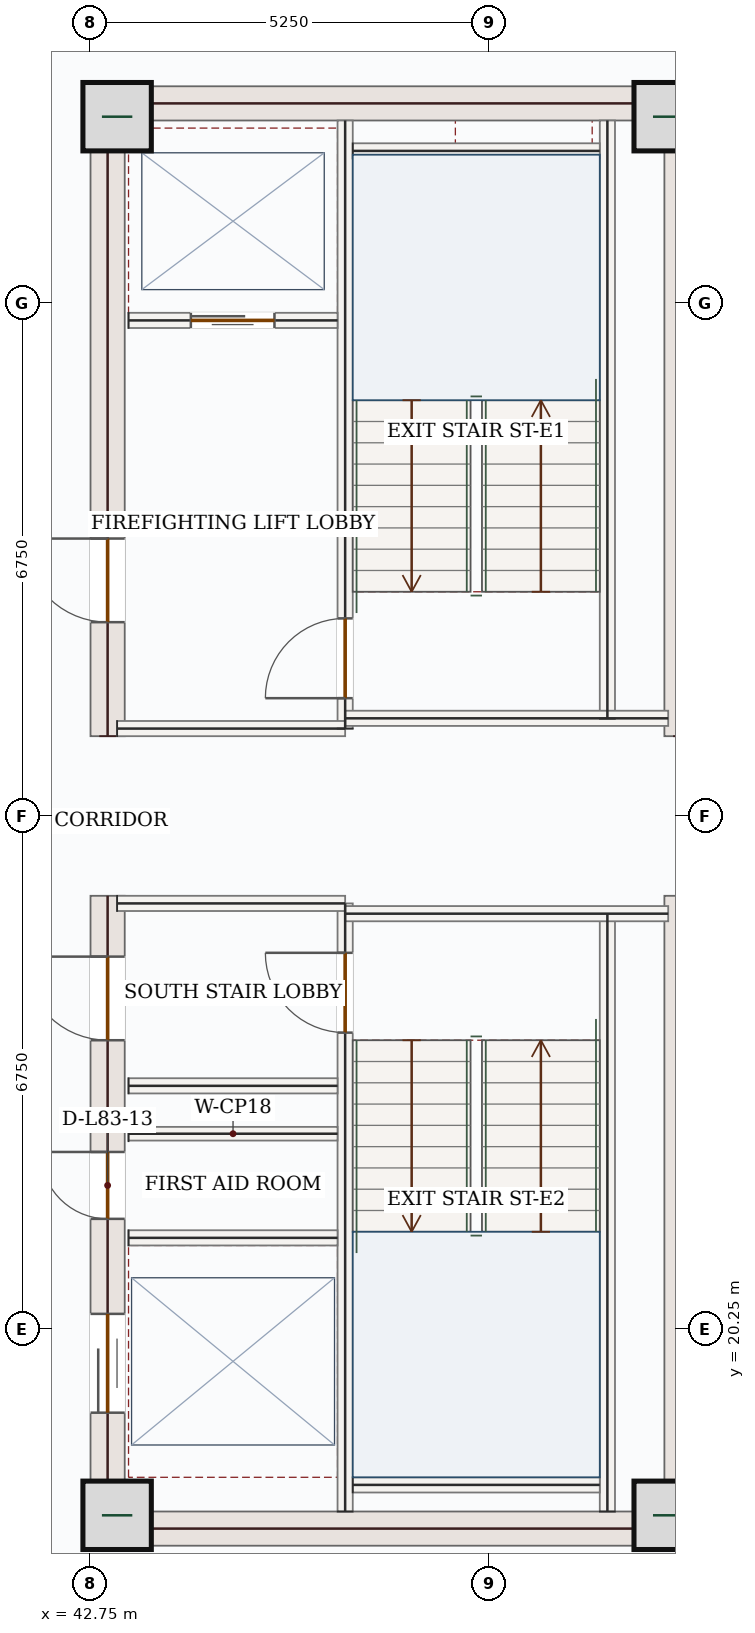
"""IFC4 building model, lengths in metres.
Left out: names, types, materials, properties, quantities, classifications, styles, units other than length and angle.
Written with IfcOpenShell. Run it as: python <this file> out.ifc"""

import sys

from ifc_helpers import new_model, si_unit, direction, frame, frame_2d, origin, origin_2d, place, context, subcontext, project, spatial, rectangle, extrude, source, transform, mapped, element, fill, save


model = new_model("IFC4")
c1 = context("Model", 3, precision=1e-05, world=origin(), true_north=direction((0.0, 1.0)))
c2 = subcontext(c1, "Body", "Model", "MODEL_VIEW")
j1 = project(units=[si_unit("LENGTHUNIT", "METRE"), si_unit("PLANEANGLEUNIT", "RADIAN")], contexts=[c1])
p1 = place(None, origin())
s1 = spatial("IfcSite", under=j1, at=p1, CompositionType="ELEMENT")
p2 = place(p1, origin())
s2 = spatial("IfcBuilding", under=s1, at=p2, CompositionType="ELEMENT")
p3 = place(p2, frame((0.0, 0.0, 342.3)))
s3 = spatial("IfcBuildingStorey", under=s2, at=p3, CompositionType="ELEMENT", Elevation=342.3)
p4 = place(p3, frame((42.975, 17.4, 0.0), z_axis=(0.0, 0.0, 1.0), x_axis=(0.0, 1.0, 0.0)))
e1 = element("IfcWall", 1, at=p4, inside=s3, PredefinedType="SHEAR", context=c2, shape_type="SweptSolid", body=[
    extrude(rectangle(XDim=8.55, YDim=0.45, at=frame_2d((4.275, 0.0))), origin(), (0.0, 0.0, 1.0), 3.5),
])
p5 = place(p4, frame((6.65, 0.0, 0.0)))
e2 = element("IfcOpeningElement", 2, at=p5, cuts=e1, PredefinedType="OPENING", context=c2, shape_type="SweptSolid", body=[
    extrude(rectangle(XDim=1.1, YDim=2.2, at=frame_2d((0.55, 1.1))), frame((0.0, 0.235, 0.0), z_axis=(0.0, -1.0, 0.0), x_axis=(1.0, 0.0, 0.0)), (0.0, 0.0, 1.0), 0.47),
])
p6 = place(p4, frame((1.75, 0.0, 0.0)))
e3 = element("IfcOpeningElement", 3, at=p6, cuts=e1, PredefinedType="OPENING", context=c2, shape_type="SweptSolid", body=[
    extrude(rectangle(XDim=1.3, YDim=2.2, at=frame_2d((0.65, 1.1))), frame((0.0, 0.235, 0.0), z_axis=(0.0, -1.0, 0.0), x_axis=(1.0, 0.0, 0.0)), (0.0, 0.0, 1.0), 0.47),
])
p7 = place(p4, frame((4.3, 0.0, 0.0)))
e4 = element("IfcOpeningElement", 4, at=p7, cuts=e1, PredefinedType="OPENING", context=c2, shape_type="SweptSolid", body=[
    extrude(rectangle(XDim=0.88, YDim=2.1, at=frame_2d((0.44, 1.05))), frame((0.0, 0.235, 0.0), z_axis=(0.0, -1.0, 0.0), x_axis=(1.0, 0.0, 0.0)), (0.0, 0.0, 1.0), 0.47),
])
p8 = place(p3, frame((42.975, 28.05, 0.0), z_axis=(0.0, 0.0, 1.0), x_axis=(0.0, 1.0, 0.0)))
e5 = element("IfcWall", 5, at=p8, inside=s3, PredefinedType="SHEAR", context=c2, shape_type="SweptSolid", body=[
    extrude(rectangle(XDim=8.55, YDim=0.45, at=frame_2d((4.275, 0.0))), origin(), (0.0, 0.0, 1.0), 3.5),
])
p9 = place(p8, frame((1.5, 0.0, 0.0)))
e6 = element("IfcOpeningElement", 6, at=p9, cuts=e5, PredefinedType="OPENING", context=c2, shape_type="SweptSolid", body=[
    extrude(rectangle(XDim=1.1, YDim=2.2, at=frame_2d((0.55, 1.1))), frame((0.0, 0.235, 0.0), z_axis=(0.0, -1.0, 0.0), x_axis=(1.0, 0.0, 0.0)), (0.0, 0.0, 1.0), 0.47),
])
m1 = source(origin(), c2, "Body", "SweptSolid", [
    extrude(rectangle(XDim=8.55, YDim=0.45, at=frame_2d((4.275, 0.0))), origin(), (0.0, 0.0, 1.0), 3.5),
])
for number, where, z_axis, x_axis in (
    (7, (50.525, 17.4, 0.0), (0.0, 0.0, 1.0), (0.0, 1.0, 0.0)),
    (8, (50.525, 28.05, 0.0), (0.0, 0.0, 1.0), (0.0, 1.0, 0.0)),
):
    element("IfcWall", number, at=place(p3, frame(where, z_axis=z_axis, x_axis=x_axis)), inside=s3, PredefinedType="SHEAR", context=c2, shape_type="MappedRepresentation", body=[
        mapped(m1, transform((0.0, 0.0, 0.0), x_axis=(1.0, 0.0, 0.0), y_axis=(0.0, 1.0, 0.0), z_axis=(0.0, 0.0, 1.0), scale=1.0)),
    ])
m2 = source(origin(), c2, "Body", "SweptSolid", [
    extrude(rectangle(XDim=7.1, YDim=0.45, at=frame_2d((3.55, 0.0))), origin(), (0.0, 0.0, 1.0), 3.5),
])
for number, where, z_axis, x_axis in (
    (9, (43.2, 17.625, 0.0), (0.0, 0.0, 1.0), (1.0, 0.0, 0.0)),
    (10, (43.2, 36.375, 0.0), (0.0, 0.0, 1.0), (1.0, 0.0, 0.0)),
):
    element("IfcWall", number, at=place(p3, frame(where, z_axis=z_axis, x_axis=x_axis)), inside=s3, PredefinedType="SHEAR", context=c2, shape_type="MappedRepresentation", body=[
        mapped(m2, transform((0.0, 0.0, 0.0), x_axis=(1.0, 0.0, 0.0), y_axis=(0.0, 1.0, 0.0), z_axis=(0.0, 0.0, 1.0), scale=1.0)),
    ])
m3 = source(origin(), c2, "Body", "SweptSolid", [
    extrude(rectangle(XDim=0.9, YDim=0.9, at=origin_2d()), origin(), (0.0, 0.0, 1.0), 3.75),
])
for number, where, z_axis, x_axis in (
    (11, (43.1, 17.8, 0.0), (0.0, 0.0, 1.0), (1.0, 0.0, 0.0)),
    (12, (50.35, 17.8, 0.0), (0.0, 0.0, 1.0), (1.0, 0.0, 0.0)),
    (13, (43.1, 36.2, 0.0), (0.0, 0.0, 1.0), (1.0, 0.0, 0.0)),
    (14, (50.35, 36.2, 0.0), (0.0, 0.0, 1.0), (1.0, 0.0, 0.0)),
):
    element("IfcColumn", number, at=place(p3, frame(where, z_axis=z_axis, x_axis=x_axis)), inside=s3, PredefinedType="COLUMN", context=c2, shape_type="MappedRepresentation", body=[
        mapped(m3, transform((0.0, 0.0, 0.0), x_axis=(1.0, 0.0, 0.0), y_axis=(0.0, 1.0, 0.0), z_axis=(0.0, 0.0, 1.0), scale=1.0)),
    ])
p10 = place(p3, frame((49.833, 39.006, 0.0), z_axis=(0.0, 0.0, 1.0), x_axis=(0.681733754317, -0.731600361006, 0.0)))
e15 = element("IfcWall", 15, at=p10, inside=s3, PredefinedType="SOLIDWALL", context=c2, shape_type="SweptSolid", body=[
    extrude(rectangle(XDim=4.734, YDim=0.28, at=frame_2d((2.367, 0.0))), origin(), (0.0, 0.0, 1.0), 3.5),
])
p11 = place(p10, frame((1.617, 0.0, 0.85)))
e16 = element("IfcOpeningElement", 16, at=p11, cuts=e15, PredefinedType="OPENING", context=c2, shape_type="SweptSolid", body=[
    extrude(rectangle(XDim=1.5, YDim=1.5, at=frame_2d((0.75, 0.75))), frame((0.0, 0.15, 0.0), z_axis=(0.0, -1.0, 0.0), x_axis=(1.0, 0.0, 0.0)), (0.0, 0.0, 1.0), 0.3),
])
m4 = source(origin(), c2, "Body", "SweptSolid", [
    extrude(rectangle(XDim=7.87, YDim=0.2, at=frame_2d((3.935, 0.0))), origin(), (0.0, 0.0, 1.0), 3.5),
])
for number, where, z_axis, x_axis in (
    (17, (49.55, 17.85, 0.0), (0.0, 0.0, 1.0), (0.0, 1.0, 0.0)),
    (18, (49.55, 28.28, 0.0), (0.0, 0.0, 1.0), (0.0, 1.0, 0.0)),
):
    element("IfcWall", number, at=place(p3, frame(where, z_axis=z_axis, x_axis=x_axis)), inside=s3, PredefinedType="SOLIDWALL", context=c2, shape_type="MappedRepresentation", body=[
        mapped(m4, transform((0.0, 0.0, 0.0), x_axis=(1.0, 0.0, 0.0), y_axis=(0.0, 1.0, 0.0), z_axis=(0.0, 0.0, 1.0), scale=1.0)),
    ])
p12 = place(p3, frame((46.1, 17.85, 0.0), z_axis=(0.0, 0.0, 1.0), x_axis=(0.0, 1.0, 0.0)))
e19 = element("IfcWall", 19, at=p12, inside=s3, PredefinedType="SOLIDWALL", context=c2, shape_type="SweptSolid", body=[
    extrude(rectangle(XDim=8.0, YDim=0.2, at=frame_2d((4.0, 0.0))), origin(), (0.0, 0.0, 1.0), 3.5),
])
p13 = place(p12, frame((6.3, 0.0, 0.0)))
e20 = element("IfcOpeningElement", 20, at=p13, cuts=e19, PredefinedType="OPENING", context=c2, shape_type="SweptSolid", body=[
    extrude(rectangle(XDim=1.05, YDim=2.15, at=frame_2d((0.525, 1.075))), frame((0.0, 0.11, 0.0), z_axis=(0.0, -1.0, 0.0), x_axis=(1.0, 0.0, 0.0)), (0.0, 0.0, 1.0), 0.22),
])
p14 = place(p3, frame((46.1, 28.15, 0.0), z_axis=(0.0, 0.0, 1.0), x_axis=(0.0, 1.0, 0.0)))
e21 = element("IfcWall", 21, at=p14, inside=s3, PredefinedType="SOLIDWALL", context=c2, shape_type="SweptSolid", body=[
    extrude(rectangle(XDim=8.0, YDim=0.2, at=frame_2d((4.0, 0.0))), origin(), (0.0, 0.0, 1.0), 3.5),
])
p15 = place(p14, frame((0.4, 0.0, 0.0)))
e22 = element("IfcOpeningElement", 22, at=p15, cuts=e21, PredefinedType="OPENING", context=c2, shape_type="SweptSolid", body=[
    extrude(rectangle(XDim=1.05, YDim=2.15, at=frame_2d((0.525, 1.075))), frame((0.0, 0.11, 0.0), z_axis=(0.0, -1.0, 0.0), x_axis=(1.0, 0.0, 0.0)), (0.0, 0.0, 1.0), 0.22),
])
m5 = source(origin(), c2, "Body", "SweptSolid", [
    extrude(rectangle(XDim=3.0, YDim=0.2, at=frame_2d((1.5, 0.0))), origin(), (0.0, 0.0, 1.0), 3.5),
])
p16 = place(p3, frame((43.1, 25.85, 0.0), z_axis=(0.0, 0.0, 1.0), x_axis=(1.0, 0.0, 0.0)))
e23 = element("IfcWall", 23, at=p16, inside=s3, PredefinedType="SOLIDWALL", context=c2, shape_type="MappedRepresentation", body=[
    mapped(m5, transform((0.0, 0.0, 0.0), x_axis=(1.0, 0.0, 0.0), y_axis=(0.0, 1.0, 0.0), z_axis=(0.0, 0.0, 1.0), scale=1.0)),
])
m6 = source(origin(), c2, "Body", "SweptSolid", [
    extrude(rectangle(XDim=4.25, YDim=0.2, at=frame_2d((2.125, 0.0))), origin(), (0.0, 0.0, 1.0), 3.5),
])
p17 = place(p3, frame((46.1, 25.715, 0.0), z_axis=(0.0, 0.0, 1.0), x_axis=(1.0, 0.0, 0.0)))
e24 = element("IfcWall", 24, at=p17, inside=s3, PredefinedType="SOLIDWALL", context=c2, shape_type="MappedRepresentation", body=[
    mapped(m6, transform((0.0, 0.0, 0.0), x_axis=(1.0, 0.0, 0.0), y_axis=(0.0, 1.0, 0.0), z_axis=(0.0, 0.0, 1.0), scale=1.0)),
])
p18 = place(p3, frame((43.1, 28.15, 0.0), z_axis=(0.0, 0.0, 1.0), x_axis=(1.0, 0.0, 0.0)))
e25 = element("IfcWall", 25, at=p18, inside=s3, PredefinedType="SOLIDWALL", context=c2, shape_type="MappedRepresentation", body=[
    mapped(m5, transform((0.0, 0.0, 0.0), x_axis=(1.0, 0.0, 0.0), y_axis=(0.0, 1.0, 0.0), z_axis=(0.0, 0.0, 1.0), scale=1.0)),
])
p19 = place(p3, frame((46.1, 28.285, 0.0), z_axis=(0.0, 0.0, 1.0), x_axis=(1.0, 0.0, 0.0)))
e26 = element("IfcWall", 26, at=p19, inside=s3, PredefinedType="SOLIDWALL", context=c2, shape_type="MappedRepresentation", body=[
    mapped(m6, transform((0.0, 0.0, 0.0), x_axis=(1.0, 0.0, 0.0), y_axis=(0.0, 1.0, 0.0), z_axis=(0.0, 0.0, 1.0), scale=1.0)),
])
m7 = source(origin(), c2, "Body", "SweptSolid", [
    extrude(rectangle(XDim=3.25, YDim=0.2, at=frame_2d((1.625, 0.0))), origin(), (0.0, 0.0, 1.0), 3.5),
])
for number, where, z_axis, x_axis in (
    (27, (46.2, 35.75, 0.0), (0.0, 0.0, 1.0), (1.0, 0.0, 0.0)),
    (28, (46.2, 18.2, 0.0), (0.0, 0.0, 1.0), (1.0, 0.0, 0.0)),
):
    element("IfcWall", number, at=place(p3, frame(where, z_axis=z_axis, x_axis=x_axis)), inside=s3, PredefinedType="SOLIDWALL", context=c2, shape_type="MappedRepresentation", body=[
        mapped(m7, transform((0.0, 0.0, 0.0), x_axis=(1.0, 0.0, 0.0), y_axis=(0.0, 1.0, 0.0), z_axis=(0.0, 0.0, 1.0), scale=1.0)),
    ])
p20 = place(p3, frame((43.25, 33.52, 0.0), z_axis=(0.0, 0.0, 1.0), x_axis=(1.0, 0.0, 0.0)))
e29 = element("IfcWall", 29, at=p20, inside=s3, PredefinedType="SOLIDWALL", context=c2, shape_type="SweptSolid", body=[
    extrude(rectangle(XDim=2.75, YDim=0.2, at=frame_2d((1.375, 0.0))), origin(), (0.0, 0.0, 1.0), 3.5),
])
p21 = place(p20, frame((0.82, 0.0, 0.0)))
e30 = element("IfcOpeningElement", 30, at=p21, cuts=e29, PredefinedType="OPENING", context=c2, shape_type="SweptSolid", body=[
    extrude(rectangle(XDim=1.1, YDim=2.15, at=frame_2d((0.55, 1.075))), frame((0.0, 0.11, 0.0), z_axis=(0.0, -1.0, 0.0), x_axis=(1.0, 0.0, 0.0)), (0.0, 0.0, 1.0), 0.22),
])
m8 = source(origin(), c2, "Body", "SweptSolid", [
    extrude(rectangle(XDim=2.75, YDim=0.2, at=frame_2d((1.375, 0.0))), origin(), (0.0, 0.0, 1.0), 3.5),
])
for number, where, z_axis, x_axis in (
    (31, (43.25, 23.45, 0.0), (0.0, 0.0, 1.0), (1.0, 0.0, 0.0)),
    (32, (43.25, 21.45, 0.0), (0.0, 0.0, 1.0), (1.0, 0.0, 0.0)),
):
    element("IfcWall", number, at=place(p3, frame(where, z_axis=z_axis, x_axis=x_axis)), inside=s3, PredefinedType="SOLIDWALL", context=c2, shape_type="MappedRepresentation", body=[
        mapped(m8, transform((0.0, 0.0, 0.0), x_axis=(1.0, 0.0, 0.0), y_axis=(0.0, 1.0, 0.0), z_axis=(0.0, 0.0, 1.0), scale=1.0)),
    ])
m9 = source(origin(), c2, "Body", "SweptSolid", [
    extrude(rectangle(XDim=2.75, YDim=0.18, at=frame_2d((1.375, 0.0))), origin(), (0.0, 0.0, 1.0), 3.5),
])
p22 = place(p3, frame((43.25, 22.82, 0.0), z_axis=(0.0, 0.0, 1.0), x_axis=(1.0, 0.0, 0.0)))
e33 = element("IfcWall", 33, at=p22, inside=s3, PredefinedType="PARTITIONING", context=c2, shape_type="MappedRepresentation", body=[
    mapped(m9, transform((0.0, 0.0, 0.0), x_axis=(1.0, 0.0, 0.0), y_axis=(0.0, 1.0, 0.0), z_axis=(0.0, 0.0, 1.0), scale=1.0)),
])
m10 = source(origin(), c2, "Body", "SweptSolid", [
    extrude(rectangle(XDim=1.05, YDim=2.15, at=frame_2d((0.525, 1.075))), frame((0.0, 0.025, 0.0), z_axis=(0.0, -1.0, 0.0), x_axis=(1.0, 0.0, 0.0)), (0.0, 0.0, 1.0), 0.05),
])
p23 = place(p15, origin())
e34 = element("IfcDoor", 34, at=p23, inside=s3, OperationType="SINGLE_SWING_LEFT", PredefinedType="DOOR", context=c2, shape_type="MappedRepresentation", body=[
    mapped(m10, transform((0.0, 0.0, 0.0), x_axis=(1.0, 0.0, 0.0), y_axis=(0.0, 1.0, 0.0), z_axis=(0.0, 0.0, 1.0), scale=1.0)),
])
fill(e22, e34)
p24 = place(p13, origin())
e35 = element("IfcDoor", 35, at=p24, inside=s3, OperationType="SINGLE_SWING_RIGHT", PredefinedType="DOOR", context=c2, shape_type="MappedRepresentation", body=[
    mapped(m10, transform((0.0, 0.0, 0.0), x_axis=(1.0, 0.0, 0.0), y_axis=(0.0, 1.0, 0.0), z_axis=(0.0, 0.0, 1.0), scale=1.0)),
])
fill(e20, e35)
m11 = source(origin(), c2, "Body", "SweptSolid", [
    extrude(rectangle(XDim=1.1, YDim=2.15, at=frame_2d((0.55, 1.075))), frame((0.0, 0.025, 0.0), z_axis=(0.0, -1.0, 0.0), x_axis=(1.0, 0.0, 0.0)), (0.0, 0.0, 1.0), 0.05),
])
p25 = place(p21, origin())
e36 = element("IfcDoor", 36, at=p25, inside=s3, OperationType="DOUBLE_DOOR_SLIDING", PredefinedType="DOOR", context=c2, shape_type="MappedRepresentation", body=[
    mapped(m11, transform((0.0, 0.0, 0.0), x_axis=(1.0, 0.0, 0.0), y_axis=(0.0, 1.0, 0.0), z_axis=(0.0, 0.0, 1.0), scale=1.0)),
])
fill(e30, e36)
m12 = source(origin(), c2, "Body", "SweptSolid", [
    extrude(rectangle(XDim=1.1, YDim=2.2, at=frame_2d((0.55, 1.1))), frame((0.0, 0.025, 0.0), z_axis=(0.0, -1.0, 0.0), x_axis=(1.0, 0.0, 0.0)), (0.0, 0.0, 1.0), 0.05),
])
p26 = place(p9, origin())
e37 = element("IfcDoor", 37, at=p26, inside=s3, OperationType="SINGLE_SWING_RIGHT", PredefinedType="DOOR", context=c2, shape_type="MappedRepresentation", body=[
    mapped(m12, transform((0.0, 0.0, 0.0), x_axis=(1.0, 0.0, 0.0), y_axis=(0.0, 1.0, 0.0), z_axis=(0.0, 0.0, 1.0), scale=1.0)),
])
fill(e6, e37)
p27 = place(p5, origin())
e38 = element("IfcDoor", 38, at=p27, inside=s3, OperationType="SINGLE_SWING_RIGHT", PredefinedType="DOOR", context=c2, shape_type="MappedRepresentation", body=[
    mapped(m12, transform((0.0, 0.0, 0.0), x_axis=(1.0, 0.0, 0.0), y_axis=(0.0, 1.0, 0.0), z_axis=(0.0, 0.0, 1.0), scale=1.0)),
])
fill(e2, e38)
m13 = source(origin(), c2, "Body", "SweptSolid", [
    extrude(rectangle(XDim=1.3, YDim=2.2, at=frame_2d((0.65, 1.1))), frame((0.0, 0.025, 0.0), z_axis=(0.0, -1.0, 0.0), x_axis=(1.0, 0.0, 0.0)), (0.0, 0.0, 1.0), 0.05),
])
p28 = place(p6, origin())
e39 = element("IfcDoor", 39, at=p28, inside=s3, OperationType="DOUBLE_DOOR_SLIDING", PredefinedType="DOOR", context=c2, shape_type="MappedRepresentation", body=[
    mapped(m13, transform((0.0, 0.0, 0.0), x_axis=(1.0, 0.0, 0.0), y_axis=(0.0, 1.0, 0.0), z_axis=(0.0, 0.0, 1.0), scale=1.0)),
])
fill(e3, e39)
m14 = source(origin(), c2, "Body", "SweptSolid", [
    extrude(rectangle(XDim=0.88, YDim=2.1, at=frame_2d((0.44, 1.05))), frame((0.0, 0.025, 0.0), z_axis=(0.0, -1.0, 0.0), x_axis=(1.0, 0.0, 0.0)), (0.0, 0.0, 1.0), 0.05),
])
p29 = place(p7, origin())
e40 = element("IfcDoor", 40, at=p29, inside=s3, OperationType="SINGLE_SWING_RIGHT", PredefinedType="DOOR", context=c2, shape_type="MappedRepresentation", body=[
    mapped(m14, transform((0.0, 0.0, 0.0), x_axis=(1.0, 0.0, 0.0), y_axis=(0.0, 1.0, 0.0), z_axis=(0.0, 0.0, 1.0), scale=1.0)),
])
fill(e4, e40)
save(model, sys.argv[1])
